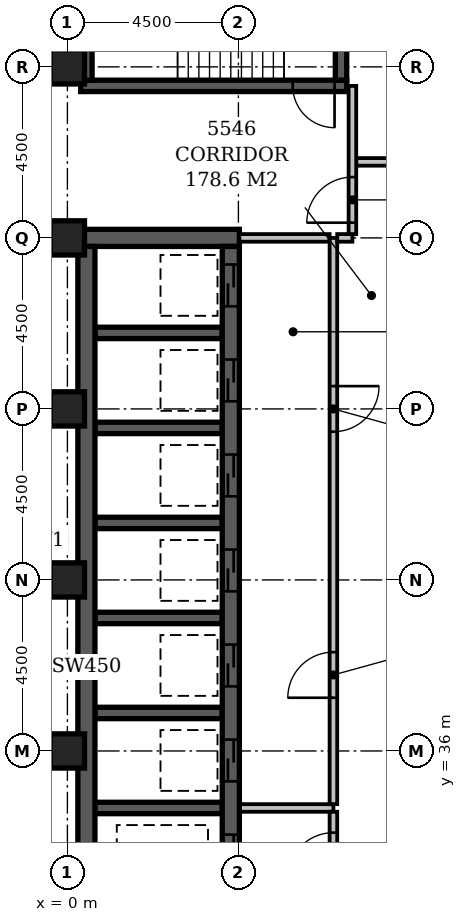
"""IFC4 building model, lengths in metres.
Left out: names, types, materials, properties, quantities, classifications, styles, units other than length and angle.
Written with IfcOpenShell. Run it as: python <this file> out.ifc"""

import sys

from ifc_helpers import new_model, si_unit, direction, frame, frame_2d, origin, origin_2d, place, context, subcontext, project, spatial, rectangle, extrude, element, fill, save


model = new_model("IFC4")
c1 = context("Model", 3, precision=1e-05, world=origin(), true_north=direction((0.0, 1.0)))
c2 = subcontext(c1, "Body", "Model", "MODEL_VIEW")
j1 = project(units=[si_unit("LENGTHUNIT", "METRE"), si_unit("PLANEANGLEUNIT", "RADIAN")], contexts=[c1])
p1 = place(None, origin())
s1 = spatial("IfcSite", under=j1, at=p1, CompositionType="ELEMENT")
p2 = place(p1, origin())
s2 = spatial("IfcBuilding", under=s1, at=p2, CompositionType="ELEMENT")
p3 = place(p2, frame((0.0, 0.0, 215.0)))
s3 = spatial("IfcBuildingStorey", under=s2, at=p3, CompositionType="ELEMENT", Elevation=215.0)
p4 = place(p3, frame((0.275, 49.5, -0.3), z_axis=(0.0, 0.0, 1.0), x_axis=(1.0, 0.0, 0.0)))
e1 = element("IfcWall", 1, at=p4, inside=s3, PredefinedType="SHEAR", context=c2, shape_type="SweptSolid", body=[
    extrude(rectangle(XDim=4.25, YDim=0.45, at=frame_2d((2.125, 0.0))), origin(), (0.0, 0.0, 1.0), 3.6),
])
p5 = place(p3, frame((0.35, 53.5, -0.3), z_axis=(0.0, 0.0, 1.0), x_axis=(1.0, 0.0, 0.0)))
e2 = element("IfcWall", 2, at=p5, inside=s3, PredefinedType="SHEAR", context=c2, shape_type="SweptSolid", body=[
    extrude(rectangle(XDim=7.0, YDim=0.3, at=frame_2d((3.5, 0.0))), origin(), (0.0, 0.0, 1.0), 3.6),
])
p6 = place(p5, frame((5.58, 0.0, 0.3)))
e3 = element("IfcOpeningElement", 3, at=p6, cuts=e2, PredefinedType="OPENING", context=c2, shape_type="SweptSolid", body=[
    extrude(rectangle(XDim=1.1, YDim=2.1, at=frame_2d((0.55, 1.05))), frame((0.0, 0.162, 0.0), z_axis=(0.0, -1.0, 0.0), x_axis=(1.0, 0.0, 0.0)), (0.0, 0.0, 1.0), 0.324),
])
p7 = place(p3, frame((0.5, 27.15, -0.3), z_axis=(0.0, 0.0, 1.0), x_axis=(0.0, 1.0, 0.0)))
e4 = element("IfcWall", 4, at=p7, inside=s3, PredefinedType="SHEAR", context=c2, shape_type="SweptSolid", body=[
    extrude(rectangle(XDim=22.125, YDim=0.45, at=frame_2d((11.062, 0.0))), origin(), (0.0, 0.0, 1.0), 3.6),
])
p8 = place(p3, frame((0.5, 53.65, -0.3), z_axis=(0.0, 0.0, 1.0), x_axis=(0.0, 1.0, 0.0)))
e5 = element("IfcWall", 5, at=p8, inside=s3, PredefinedType="SHEAR", context=c2, shape_type="SweptSolid", body=[
    extrude(rectangle(XDim=4.2, YDim=0.3, at=frame_2d((2.1, 0.0))), origin(), (0.0, 0.0, 1.0), 3.6),
])
for number, where, z_axis, x_axis in (
    (6, (0.725, 34.5, -0.3), (0.0, 0.0, 1.0), (1.0, 0.0, 0.0)),
    (7, (0.725, 37.0, -0.3), (0.0, 0.0, 1.0), (1.0, 0.0, 0.0)),
    (8, (0.725, 39.5, -0.3), (0.0, 0.0, 1.0), (1.0, 0.0, 0.0)),
    (9, (0.725, 42.0, -0.3), (0.0, 0.0, 1.0), (1.0, 0.0, 0.0)),
    (10, (0.725, 44.5, -0.3), (0.0, 0.0, 1.0), (1.0, 0.0, 0.0)),
    (11, (0.725, 47.0, -0.3), (0.0, 0.0, 1.0), (1.0, 0.0, 0.0)),
):
    element("IfcWall", number, at=place(p3, frame(where, z_axis=z_axis, x_axis=x_axis)), inside=s3, PredefinedType="SHEAR", context=c2, shape_type="SweptSolid", body=[
        extrude(rectangle(XDim=3.35, YDim=0.3, at=frame_2d((1.675, 0.0))), origin(), (0.0, 0.0, 1.0), 3.6),
    ])
p9 = place(p3, frame((4.3, 27.15, -0.3), z_axis=(0.0, 0.0, 1.0), x_axis=(0.0, 1.0, 0.0)))
e12 = element("IfcWall", 12, at=p9, inside=s3, PredefinedType="SHEAR", context=c2, shape_type="SweptSolid", body=[
    extrude(rectangle(XDim=22.125, YDim=0.45, at=frame_2d((11.062, 0.0))), origin(), (0.0, 0.0, 1.0), 3.6),
])
p10 = place(p9, frame((3.05, 0.0, 0.3)))
e13 = element("IfcOpeningElement", 13, at=p10, cuts=e12, PredefinedType="OPENING", context=c2, shape_type="SweptSolid", body=[
    extrude(rectangle(XDim=1.1, YDim=2.1, at=frame_2d((0.55, 1.05))), frame((0.0, 0.237, 0.0), z_axis=(0.0, -1.0, 0.0), x_axis=(1.0, 0.0, 0.0)), (0.0, 0.0, 1.0), 0.474),
])
p11 = place(p9, frame((0.55, 0.0, 0.3)))
e14 = element("IfcOpeningElement", 14, at=p11, cuts=e12, PredefinedType="OPENING", context=c2, shape_type="SweptSolid", body=[
    extrude(rectangle(XDim=1.1, YDim=2.1, at=frame_2d((0.55, 1.05))), frame((0.0, 0.237, 0.0), z_axis=(0.0, -1.0, 0.0), x_axis=(1.0, 0.0, 0.0)), (0.0, 0.0, 1.0), 0.474),
])
p12 = place(p9, frame((20.55, 0.0, 0.3)))
e15 = element("IfcOpeningElement", 15, at=p12, cuts=e12, PredefinedType="OPENING", context=c2, shape_type="SweptSolid", body=[
    extrude(rectangle(XDim=1.1, YDim=2.1, at=frame_2d((0.55, 1.05))), frame((0.0, 0.237, 0.0), z_axis=(0.0, -1.0, 0.0), x_axis=(1.0, 0.0, 0.0)), (0.0, 0.0, 1.0), 0.474),
])
p13 = place(p9, frame((18.05, 0.0, 0.3)))
e16 = element("IfcOpeningElement", 16, at=p13, cuts=e12, PredefinedType="OPENING", context=c2, shape_type="SweptSolid", body=[
    extrude(rectangle(XDim=1.1, YDim=2.1, at=frame_2d((0.55, 1.05))), frame((0.0, 0.237, 0.0), z_axis=(0.0, -1.0, 0.0), x_axis=(1.0, 0.0, 0.0)), (0.0, 0.0, 1.0), 0.474),
])
p14 = place(p9, frame((15.55, 0.0, 0.3)))
e17 = element("IfcOpeningElement", 17, at=p14, cuts=e12, PredefinedType="OPENING", context=c2, shape_type="SweptSolid", body=[
    extrude(rectangle(XDim=1.1, YDim=2.1, at=frame_2d((0.55, 1.05))), frame((0.0, 0.237, 0.0), z_axis=(0.0, -1.0, 0.0), x_axis=(1.0, 0.0, 0.0)), (0.0, 0.0, 1.0), 0.474),
])
p15 = place(p9, frame((13.05, 0.0, 0.3)))
e18 = element("IfcOpeningElement", 18, at=p15, cuts=e12, PredefinedType="OPENING", context=c2, shape_type="SweptSolid", body=[
    extrude(rectangle(XDim=1.1, YDim=2.1, at=frame_2d((0.55, 1.05))), frame((0.0, 0.237, 0.0), z_axis=(0.0, -1.0, 0.0), x_axis=(1.0, 0.0, 0.0)), (0.0, 0.0, 1.0), 0.474),
])
p16 = place(p9, frame((10.55, 0.0, 0.3)))
e19 = element("IfcOpeningElement", 19, at=p16, cuts=e12, PredefinedType="OPENING", context=c2, shape_type="SweptSolid", body=[
    extrude(rectangle(XDim=1.1, YDim=2.1, at=frame_2d((0.55, 1.05))), frame((0.0, 0.237, 0.0), z_axis=(0.0, -1.0, 0.0), x_axis=(1.0, 0.0, 0.0)), (0.0, 0.0, 1.0), 0.474),
])
p17 = place(p9, frame((8.05, 0.0, 0.3)))
e20 = element("IfcOpeningElement", 20, at=p17, cuts=e12, PredefinedType="OPENING", context=c2, shape_type="SweptSolid", body=[
    extrude(rectangle(XDim=1.1, YDim=2.1, at=frame_2d((0.55, 1.05))), frame((0.0, 0.237, 0.0), z_axis=(0.0, -1.0, 0.0), x_axis=(1.0, 0.0, 0.0)), (0.0, 0.0, 1.0), 0.474),
])
p18 = place(p9, frame((5.55, 0.0, 0.3)))
e21 = element("IfcOpeningElement", 21, at=p18, cuts=e12, PredefinedType="OPENING", context=c2, shape_type="SweptSolid", body=[
    extrude(rectangle(XDim=1.1, YDim=2.1, at=frame_2d((0.55, 1.05))), frame((0.0, 0.237, 0.0), z_axis=(0.0, -1.0, 0.0), x_axis=(1.0, 0.0, 0.0)), (0.0, 0.0, 1.0), 0.474),
])
p19 = place(p3, frame((7.2, 53.65, -0.3), z_axis=(0.0, 0.0, 1.0), x_axis=(0.0, 1.0, 0.0)))
e22 = element("IfcWall", 22, at=p19, inside=s3, PredefinedType="SHEAR", context=c2, shape_type="SweptSolid", body=[
    extrude(rectangle(XDim=4.2, YDim=0.3, at=frame_2d((2.1, 0.0))), origin(), (0.0, 0.0, 1.0), 3.6),
])
for number, where, z_axis, x_axis in (
    (23, (0.0, 36.0, -0.3), (0.0, 0.0, 1.0), (1.0, 0.0, 0.0)),
    (24, (0.0, 40.5, -0.3), (0.0, 0.0, 1.0), (1.0, 0.0, 0.0)),
    (25, (0.0, 45.0, -0.3), (0.0, 0.0, 1.0), (1.0, 0.0, 0.0)),
    (26, (0.0, 49.5, -0.3), (0.0, 0.0, 1.0), (1.0, 0.0, 0.0)),
    (27, (0.0, 54.0, -0.3), (0.0, 0.0, 1.0), (1.0, 0.0, 0.0)),
):
    element("IfcColumn", number, at=place(p3, frame(where, z_axis=z_axis, x_axis=x_axis)), inside=s3, PredefinedType="COLUMN", context=c2, shape_type="SweptSolid", body=[
        extrude(rectangle(XDim=0.9, YDim=0.9, at=origin_2d()), origin(), (0.0, 0.0, 1.0), 3.6),
    ])
p20 = place(p3, frame((4.545, 34.5, 0.0), z_axis=(0.0, 0.0, 1.0), x_axis=(1.0, 0.0, 0.0)))
e28 = element("IfcWall", 28, at=p20, inside=s3, PredefinedType="PARTITIONING", context=c2, shape_type="SweptSolid", body=[
    extrude(rectangle(XDim=2.455, YDim=0.2, at=frame_2d((1.228, 0.0))), origin(), (0.0, 0.0, 1.0), 3.3),
])
p21 = place(p3, frame((7.0, 34.6, 0.0), z_axis=(0.0, 0.0, 1.0), x_axis=(0.0, 1.0, 0.0)))
e29 = element("IfcWall", 29, at=p21, inside=s3, PredefinedType="PARTITIONING", context=c2, shape_type="SweptSolid", body=[
    extrude(rectangle(XDim=14.9, YDim=0.2, at=frame_2d((7.45, 0.0))), origin(), (0.0, 0.0, 1.0), 3.3),
])
p22 = place(p21, frame((2.8, 0.0, 0.0)))
e30 = element("IfcOpeningElement", 30, at=p22, cuts=e29, PredefinedType="OPENING", context=c2, shape_type="SweptSolid", body=[
    extrude(rectangle(XDim=1.2, YDim=2.1, at=frame_2d((0.6, 1.05))), frame((0.0, 0.112, 0.0), z_axis=(0.0, -1.0, 0.0), x_axis=(1.0, 0.0, 0.0)), (0.0, 0.0, 1.0), 0.224),
])
p23 = place(p21, frame((9.8, 0.0, 0.0)))
e31 = element("IfcOpeningElement", 31, at=p23, cuts=e29, PredefinedType="OPENING", context=c2, shape_type="SweptSolid", body=[
    extrude(rectangle(XDim=1.2, YDim=2.1, at=frame_2d((0.6, 1.05))), frame((0.0, 0.112, 0.0), z_axis=(0.0, -1.0, 0.0), x_axis=(1.0, 0.0, 0.0)), (0.0, 0.0, 1.0), 0.224),
])
p24 = place(p3, frame((4.525, 49.5, 0.0), z_axis=(0.0, 0.0, 1.0), x_axis=(1.0, 0.0, 0.0)))
e32 = element("IfcWall", 32, at=p24, inside=s3, PredefinedType="PARTITIONING", context=c2, shape_type="SweptSolid", body=[
    extrude(rectangle(XDim=2.375, YDim=0.2, at=frame_2d((1.188, 0.0))), origin(), (0.0, 0.0, 1.0), 3.3),
])
p25 = place(p3, frame((7.0, 32.1, 0.0), z_axis=(0.0, 0.0, 1.0), x_axis=(0.0, 1.0, 0.0)))
e33 = element("IfcWall", 33, at=p25, inside=s3, PredefinedType="PARTITIONING", context=c2, shape_type="SweptSolid", body=[
    extrude(rectangle(XDim=2.3, YDim=0.2, at=frame_2d((1.15, 0.0))), origin(), (0.0, 0.0, 1.0), 3.3),
])
p26 = place(p25, frame((0.55, 0.0, 0.0)))
e34 = element("IfcOpeningElement", 34, at=p26, cuts=e33, PredefinedType="OPENING", context=c2, shape_type="SweptSolid", body=[
    extrude(rectangle(XDim=1.2, YDim=2.1, at=frame_2d((0.6, 1.05))), frame((0.0, 0.112, 0.0), z_axis=(0.0, -1.0, 0.0), x_axis=(1.0, 0.0, 0.0)), (0.0, 0.0, 1.0), 0.224),
])
p27 = place(p3, frame((7.1, 49.5, 0.0), z_axis=(0.0, 0.0, 1.0), x_axis=(1.0, 0.0, 0.0)))
e35 = element("IfcWall", 35, at=p27, inside=s3, PredefinedType="PARTITIONING", context=c2, shape_type="SweptSolid", body=[
    extrude(rectangle(XDim=0.4, YDim=0.2, at=frame_2d((0.2, 0.0))), origin(), (0.0, 0.0, 1.0), 3.3),
])
p28 = place(p3, frame((7.5, 49.6, 0.0), z_axis=(0.0, 0.0, 1.0), x_axis=(0.0, 1.0, 0.0)))
e36 = element("IfcWall", 36, at=p28, inside=s3, PredefinedType="PARTITIONING", context=c2, shape_type="SweptSolid", body=[
    extrude(rectangle(XDim=3.9, YDim=0.2, at=frame_2d((1.95, 0.0))), origin(), (0.0, 0.0, 1.0), 3.3),
])
p29 = place(p28, frame((0.3, 0.0, 0.0)))
e37 = element("IfcOpeningElement", 37, at=p29, cuts=e36, PredefinedType="OPENING", context=c2, shape_type="SweptSolid", body=[
    extrude(rectangle(XDim=1.2, YDim=2.1, at=frame_2d((0.6, 1.05))), frame((0.0, 0.112, 0.0), z_axis=(0.0, -1.0, 0.0), x_axis=(1.0, 0.0, 0.0)), (0.0, 0.0, 1.0), 0.224),
])
p30 = place(p3, frame((7.6, 51.5, 0.0), z_axis=(0.0, 0.0, 1.0), x_axis=(1.0, 0.0, 0.0)))
e38 = element("IfcWall", 38, at=p30, inside=s3, PredefinedType="PARTITIONING", context=c2, shape_type="SweptSolid", body=[
    extrude(rectangle(XDim=15.3, YDim=0.2, at=frame_2d((7.65, 0.0))), origin(), (0.0, 0.0, 1.0), 3.3),
])
p31 = place(p30, frame((7.2, 0.0, 0.0)))
e39 = element("IfcOpeningElement", 39, at=p31, cuts=e38, PredefinedType="OPENING", context=c2, shape_type="SweptSolid", body=[
    extrude(rectangle(XDim=0.9, YDim=2.1, at=frame_2d((0.45, 1.05))), frame((0.0, 0.112, 0.0), z_axis=(0.0, -1.0, 0.0), x_axis=(1.0, 0.0, 0.0)), (0.0, 0.0, 1.0), 0.224),
])
p32 = place(p29, origin())
e40 = element("IfcDoor", 40, at=p32, inside=s3, OperationType="SINGLE_SWING_LEFT", PredefinedType="DOOR", context=c2, shape_type="SweptSolid", body=[
    extrude(rectangle(XDim=1.2, YDim=2.1, at=frame_2d((0.6, 1.05))), frame((0.0, 0.025, 0.0), z_axis=(0.0, -1.0, 0.0), x_axis=(1.0, 0.0, 0.0)), (0.0, 0.0, 1.0), 0.05),
])
fill(e37, e40)
p33 = place(p12, origin())
e41 = element("IfcDoor", 41, at=p33, inside=s3, OperationType="SLIDING_TO_LEFT", PredefinedType="DOOR", context=c2, shape_type="SweptSolid", body=[
    extrude(rectangle(XDim=1.1, YDim=2.1, at=frame_2d((0.55, 1.05))), frame((0.0, 0.025, 0.0), z_axis=(0.0, -1.0, 0.0), x_axis=(1.0, 0.0, 0.0)), (0.0, 0.0, 1.0), 0.05),
])
fill(e15, e41)
p34 = place(p13, origin())
e42 = element("IfcDoor", 42, at=p34, inside=s3, OperationType="SLIDING_TO_LEFT", PredefinedType="DOOR", context=c2, shape_type="SweptSolid", body=[
    extrude(rectangle(XDim=1.1, YDim=2.1, at=frame_2d((0.55, 1.05))), frame((0.0, 0.025, 0.0), z_axis=(0.0, -1.0, 0.0), x_axis=(1.0, 0.0, 0.0)), (0.0, 0.0, 1.0), 0.05),
])
fill(e16, e42)
p35 = place(p14, origin())
e43 = element("IfcDoor", 43, at=p35, inside=s3, OperationType="SLIDING_TO_LEFT", PredefinedType="DOOR", context=c2, shape_type="SweptSolid", body=[
    extrude(rectangle(XDim=1.1, YDim=2.1, at=frame_2d((0.55, 1.05))), frame((0.0, 0.025, 0.0), z_axis=(0.0, -1.0, 0.0), x_axis=(1.0, 0.0, 0.0)), (0.0, 0.0, 1.0), 0.05),
])
fill(e17, e43)
p36 = place(p15, origin())
e44 = element("IfcDoor", 44, at=p36, inside=s3, OperationType="SLIDING_TO_LEFT", PredefinedType="DOOR", context=c2, shape_type="SweptSolid", body=[
    extrude(rectangle(XDim=1.1, YDim=2.1, at=frame_2d((0.55, 1.05))), frame((0.0, 0.025, 0.0), z_axis=(0.0, -1.0, 0.0), x_axis=(1.0, 0.0, 0.0)), (0.0, 0.0, 1.0), 0.05),
])
fill(e18, e44)
p37 = place(p16, origin())
e45 = element("IfcDoor", 45, at=p37, inside=s3, OperationType="SLIDING_TO_LEFT", PredefinedType="DOOR", context=c2, shape_type="SweptSolid", body=[
    extrude(rectangle(XDim=1.1, YDim=2.1, at=frame_2d((0.55, 1.05))), frame((0.0, 0.025, 0.0), z_axis=(0.0, -1.0, 0.0), x_axis=(1.0, 0.0, 0.0)), (0.0, 0.0, 1.0), 0.05),
])
fill(e19, e45)
p38 = place(p17, origin())
e46 = element("IfcDoor", 46, at=p38, inside=s3, OperationType="SLIDING_TO_LEFT", PredefinedType="DOOR", context=c2, shape_type="SweptSolid", body=[
    extrude(rectangle(XDim=1.1, YDim=2.1, at=frame_2d((0.55, 1.05))), frame((0.0, 0.025, 0.0), z_axis=(0.0, -1.0, 0.0), x_axis=(1.0, 0.0, 0.0)), (0.0, 0.0, 1.0), 0.05),
])
fill(e20, e46)
p39 = place(p22, origin())
e47 = element("IfcDoor", 47, at=p39, inside=s3, OperationType="SINGLE_SWING_LEFT", PredefinedType="DOOR", context=c2, shape_type="SweptSolid", body=[
    extrude(rectangle(XDim=1.2, YDim=2.1, at=frame_2d((0.6, 1.05))), frame((0.0, 0.025, 0.0), z_axis=(0.0, -1.0, 0.0), x_axis=(1.0, 0.0, 0.0)), (0.0, 0.0, 1.0), 0.05),
])
fill(e30, e47)
p40 = place(p23, origin())
e48 = element("IfcDoor", 48, at=p40, inside=s3, OperationType="SINGLE_SWING_RIGHT", PredefinedType="DOOR", context=c2, shape_type="SweptSolid", body=[
    extrude(rectangle(XDim=1.2, YDim=2.1, at=frame_2d((0.6, 1.05))), frame((0.0, 0.025, 0.0), z_axis=(0.0, -1.0, 0.0), x_axis=(1.0, 0.0, 0.0)), (0.0, 0.0, 1.0), 0.05),
])
fill(e31, e48)
p41 = place(p26, origin())
e49 = element("IfcDoor", 49, at=p41, inside=s3, OperationType="SINGLE_SWING_LEFT", PredefinedType="DOOR", context=c2, shape_type="SweptSolid", body=[
    extrude(rectangle(XDim=1.2, YDim=2.1, at=frame_2d((0.6, 1.05))), frame((0.0, 0.025, 0.0), z_axis=(0.0, -1.0, 0.0), x_axis=(1.0, 0.0, 0.0)), (0.0, 0.0, 1.0), 0.05),
])
fill(e34, e49)
p42 = place(p18, origin())
e50 = element("IfcDoor", 50, at=p42, inside=s3, OperationType="SLIDING_TO_LEFT", PredefinedType="DOOR", context=c2, shape_type="SweptSolid", body=[
    extrude(rectangle(XDim=1.1, YDim=2.1, at=frame_2d((0.55, 1.05))), frame((0.0, 0.025, 0.0), z_axis=(0.0, -1.0, 0.0), x_axis=(1.0, 0.0, 0.0)), (0.0, 0.0, 1.0), 0.05),
])
fill(e21, e50)
p43 = place(p6, origin())
e51 = element("IfcDoor", 51, at=p43, inside=s3, OperationType="SINGLE_SWING_RIGHT", PredefinedType="DOOR", context=c2, shape_type="SweptSolid", body=[
    extrude(rectangle(XDim=1.1, YDim=2.1, at=frame_2d((0.55, 1.05))), frame((0.0, 0.025, 0.0), z_axis=(0.0, -1.0, 0.0), x_axis=(1.0, 0.0, 0.0)), (0.0, 0.0, 1.0), 0.05),
])
fill(e3, e51)
save(model, sys.argv[1])
